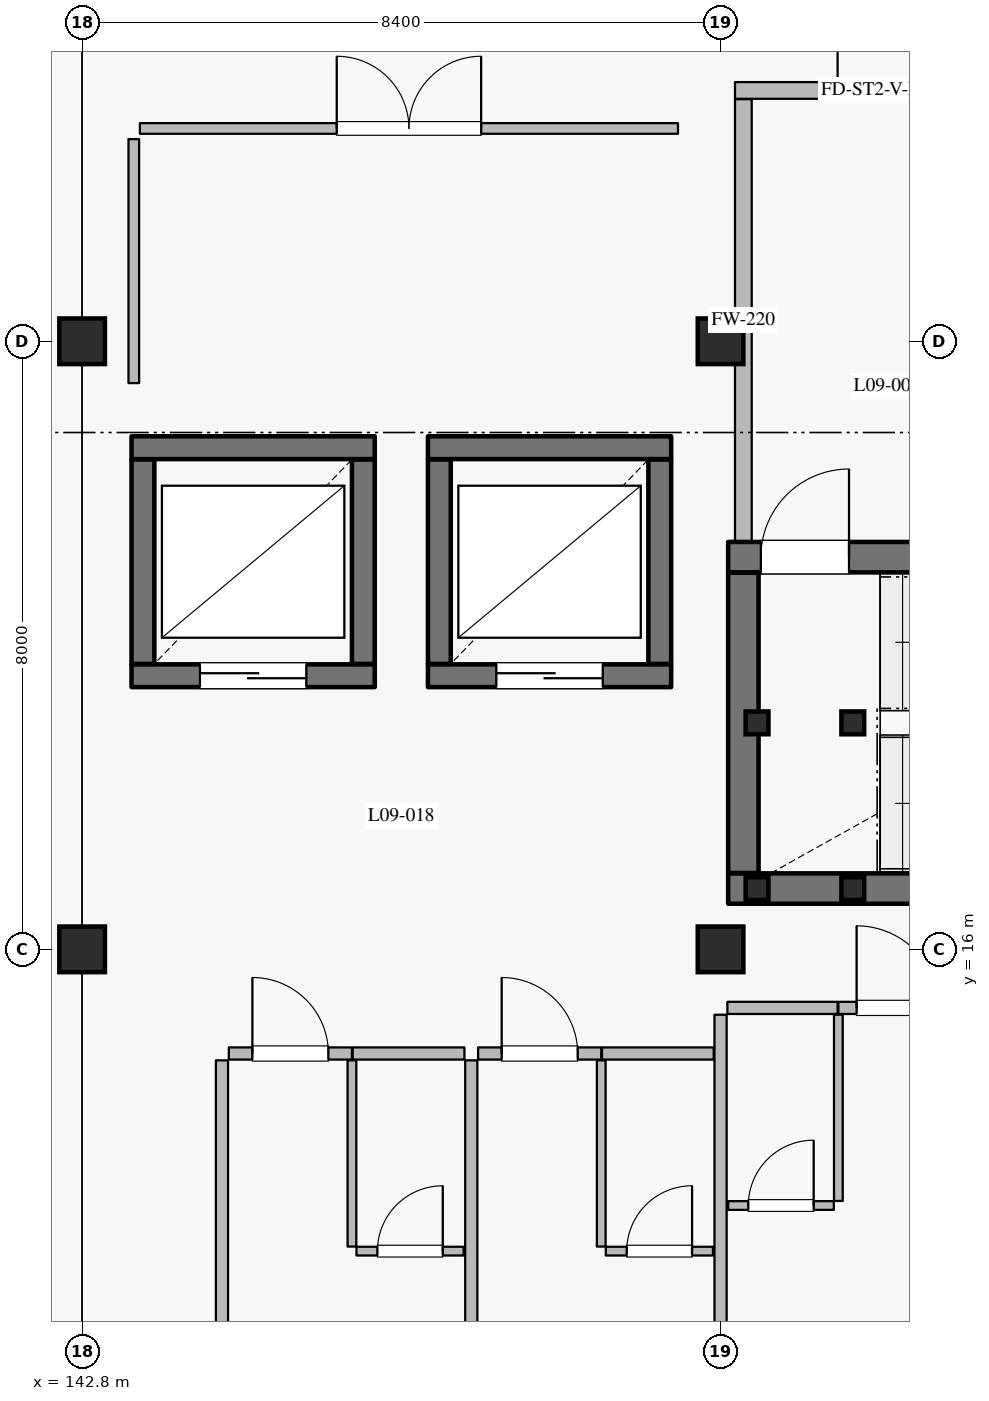
"""IFC4 building model, lengths in metres.
Left out: names, types, materials, properties, quantities, classifications, styles, units other than length and angle.
Written with IfcOpenShell. Run it as: python <this file> out.ifc"""

import sys

from ifc_helpers import new_model, si_unit, direction, frame, frame_2d, origin, origin_2d, place, context, subcontext, project, spatial, rectangle, hollow_rectangle, extrude, element, fill, save


model = new_model("IFC4")
c1 = context("Model", 3, precision=1e-05, world=origin(), true_north=direction((0.0, 1.0)))
c2 = subcontext(c1, "Body", "Model", "MODEL_VIEW")
j1 = project(units=[si_unit("LENGTHUNIT", "METRE"), si_unit("PLANEANGLEUNIT", "RADIAN")], contexts=[c1])
p1 = place(None, origin())
s1 = spatial("IfcSite", under=j1, at=p1, CompositionType="ELEMENT")
p2 = place(p1, origin())
s2 = spatial("IfcBuilding", under=s1, at=p2, CompositionType="ELEMENT")
p3 = place(p2, frame((0.0, 0.0, 39.6)))
s3 = spatial("IfcBuildingStorey", under=s2, at=p3, CompositionType="ELEMENT", Elevation=39.6)
for number, where, z_axis, x_axis in (
    (1, (142.8, 16.0, 0.0), (0.0, 0.0, 1.0), (1.0, 0.0, 0.0)),
    (2, (151.2, 24.0, 0.0), (0.0, 0.0, 1.0), (1.0, 0.0, 0.0)),
    (3, (142.8, 24.0, 0.0), (0.0, 0.0, 1.0), (1.0, 0.0, 0.0)),
    (4, (151.2, 16.0, 0.0), (0.0, 0.0, 1.0), (1.0, 0.0, 0.0)),
):
    element("IfcColumn", number, at=place(p3, frame(where, z_axis=z_axis, x_axis=x_axis)), inside=s3, PredefinedType="COLUMN", context=c2, shape_type="SweptSolid", body=[
        extrude(rectangle(XDim=0.6, YDim=0.6, at=origin_2d()), origin(), (0.0, 0.0, 1.0), 3.6),
    ])
p4 = place(p3, frame((143.45, 19.6, 0.0), z_axis=(0.0, 0.0, 1.0), x_axis=(1.0, 0.0, 0.0)))
e5 = element("IfcWall", 5, at=p4, inside=s3, PredefinedType="SHEAR", context=c2, shape_type="SweptSolid", body=[
    extrude(rectangle(XDim=3.2, YDim=0.3, at=frame_2d((1.6, 0.0))), origin(), (0.0, 0.0, 1.0), 3.335),
])
p5 = place(p4, frame((0.9, 0.0, 0.0)))
e6 = element("IfcOpeningElement", 6, at=p5, cuts=e5, PredefinedType="OPENING", context=c2, shape_type="SweptSolid", body=[
    extrude(rectangle(XDim=1.4, YDim=2.35, at=frame_2d((0.7, 1.175))), frame((0.0, 0.16, 0.0), z_axis=(0.0, -1.0, 0.0), x_axis=(1.0, 0.0, 0.0)), (0.0, 0.0, 1.0), 0.32),
])
p6 = place(p3, frame((146.5, 19.755, 0.0), z_axis=(0.0, 0.0, 1.0), x_axis=(0.0, 1.0, 0.0)))
e7 = element("IfcWall", 7, at=p6, inside=s3, PredefinedType="SHEAR", context=c2, shape_type="SweptSolid", body=[
    extrude(rectangle(XDim=2.69, YDim=0.3, at=frame_2d((1.345, 0.0))), origin(), (0.0, 0.0, 1.0), 3.335),
])
p7 = place(p3, frame((146.65, 22.6, 0.0), z_axis=(0.0, 0.0, 1.0), x_axis=(-1.0, 0.0, 0.0)))
e8 = element("IfcWall", 8, at=p7, inside=s3, PredefinedType="SHEAR", context=c2, shape_type="SweptSolid", body=[
    extrude(rectangle(XDim=3.2, YDim=0.3, at=frame_2d((1.6, 0.0))), origin(), (0.0, 0.0, 1.0), 3.335),
])
p8 = place(p3, frame((143.6, 22.445, 0.0), z_axis=(0.0, 0.0, 1.0), x_axis=(0.0, -1.0, 0.0)))
e9 = element("IfcWall", 9, at=p8, inside=s3, PredefinedType="SHEAR", context=c2, shape_type="SweptSolid", body=[
    extrude(rectangle(XDim=2.69, YDim=0.3, at=frame_2d((1.345, 0.0))), origin(), (0.0, 0.0, 1.0), 3.335),
])
p9 = place(p3, frame((147.35, 19.6, 0.0), z_axis=(0.0, 0.0, 1.0), x_axis=(1.0, 0.0, 0.0)))
e10 = element("IfcWall", 10, at=p9, inside=s3, PredefinedType="SHEAR", context=c2, shape_type="SweptSolid", body=[
    extrude(rectangle(XDim=3.2, YDim=0.3, at=frame_2d((1.6, 0.0))), origin(), (0.0, 0.0, 1.0), 3.335),
])
p10 = place(p9, frame((0.9, 0.0, 0.0)))
e11 = element("IfcOpeningElement", 11, at=p10, cuts=e10, PredefinedType="OPENING", context=c2, shape_type="SweptSolid", body=[
    extrude(rectangle(XDim=1.4, YDim=2.35, at=frame_2d((0.7, 1.175))), frame((0.0, 0.16, 0.0), z_axis=(0.0, -1.0, 0.0), x_axis=(1.0, 0.0, 0.0)), (0.0, 0.0, 1.0), 0.32),
])
p11 = place(p3, frame((150.4, 19.755, 0.0), z_axis=(0.0, 0.0, 1.0), x_axis=(0.0, 1.0, 0.0)))
e12 = element("IfcWall", 12, at=p11, inside=s3, PredefinedType="SHEAR", context=c2, shape_type="SweptSolid", body=[
    extrude(rectangle(XDim=2.69, YDim=0.3, at=frame_2d((1.345, 0.0))), origin(), (0.0, 0.0, 1.0), 3.335),
])
p12 = place(p3, frame((150.55, 22.6, 0.0), z_axis=(0.0, 0.0, 1.0), x_axis=(-1.0, 0.0, 0.0)))
e13 = element("IfcWall", 13, at=p12, inside=s3, PredefinedType="SHEAR", context=c2, shape_type="SweptSolid", body=[
    extrude(rectangle(XDim=3.2, YDim=0.3, at=frame_2d((1.6, 0.0))), origin(), (0.0, 0.0, 1.0), 3.335),
])
p13 = place(p3, frame((147.5, 22.445, 0.0), z_axis=(0.0, 0.0, 1.0), x_axis=(0.0, -1.0, 0.0)))
e14 = element("IfcWall", 14, at=p13, inside=s3, PredefinedType="SHEAR", context=c2, shape_type="SweptSolid", body=[
    extrude(rectangle(XDim=2.69, YDim=0.3, at=frame_2d((1.345, 0.0))), origin(), (0.0, 0.0, 1.0), 3.335),
])
p14 = place(p3, frame((151.3, 16.8, 0.0), z_axis=(0.0, 0.0, 1.0), x_axis=(1.0, 0.0, 0.0)))
e15 = element("IfcWall", 15, at=p14, inside=s3, PredefinedType="SHEAR", context=c2, shape_type="SweptSolid", body=[
    extrude(rectangle(XDim=8.2, YDim=0.4, at=frame_2d((4.1, 0.0))), origin(), (0.0, 0.0, 1.0), 3.335),
])
p15 = place(p3, frame((151.3, 21.16, 0.0), z_axis=(0.0, 0.0, 1.0), x_axis=(1.0, 0.0, 0.0)))
e16 = element("IfcWall", 16, at=p15, inside=s3, PredefinedType="SHEAR", context=c2, shape_type="SweptSolid", body=[
    extrude(rectangle(XDim=8.2, YDim=0.4, at=frame_2d((4.1, 0.0))), origin(), (0.0, 0.0, 1.0), 3.335),
])
p16 = place(p15, frame((0.43, 0.0, 0.0)))
e17 = element("IfcOpeningElement", 17, at=p16, cuts=e16, PredefinedType="OPENING", context=c2, shape_type="SweptSolid", body=[
    extrude(rectangle(XDim=1.16, YDim=2.2, at=frame_2d((0.58, 1.1))), frame((0.0, 0.21, 0.0), z_axis=(0.0, -1.0, 0.0), x_axis=(1.0, 0.0, 0.0)), (0.0, 0.0, 1.0), 0.42),
])
p17 = place(p3, frame((151.5, 17.005, 0.0), z_axis=(0.0, 0.0, 1.0), x_axis=(0.0, 1.0, 0.0)))
e18 = element("IfcWall", 18, at=p17, inside=s3, PredefinedType="SHEAR", context=c2, shape_type="SweptSolid", body=[
    extrude(rectangle(XDim=3.95, YDim=0.4, at=frame_2d((1.975, 0.0))), origin(), (0.0, 0.0, 1.0), 3.335),
])
p18 = place(p3, frame((151.5, 21.365, 0.0), z_axis=(0.0, 0.0, 1.0), x_axis=(0.0, 1.0, 0.0)))
e19 = element("IfcWall", 19, at=p18, inside=s3, PredefinedType="PARTITIONING", context=c2, shape_type="SweptSolid", body=[
    extrude(rectangle(XDim=5.82, YDim=0.22, at=frame_2d((2.91, 0.0))), origin(), (0.0, 0.0, 1.0), 3.335),
])
p19 = place(p3, frame((151.39, 27.3, 0.0), z_axis=(0.0, 0.0, 1.0), x_axis=(1.0, 0.0, 0.0)))
e20 = element("IfcWall", 20, at=p19, inside=s3, PredefinedType="PARTITIONING", context=c2, shape_type="SweptSolid", body=[
    extrude(rectangle(XDim=3.82, YDim=0.22, at=frame_2d((1.91, 0.0))), origin(), (0.0, 0.0, 1.0), 3.335),
])
p20 = place(p19, frame((1.35, 0.0, 0.0)))
e21 = element("IfcOpeningElement", 21, at=p20, cuts=e20, PredefinedType="OPENING", context=c2, shape_type="SweptSolid", body=[
    extrude(rectangle(XDim=1.12, YDim=2.2, at=frame_2d((0.56, 1.1))), frame((0.0, 0.12, 0.0), z_axis=(0.0, -1.0, 0.0), x_axis=(1.0, 0.0, 0.0)), (0.0, 0.0, 1.0), 0.24),
])
for number, where, z_axis, x_axis in (
    (22, (151.68, 16.8, 0.0), (0.0, 0.0, 1.0), (1.0, 0.0, 0.0)),
    (23, (151.68, 18.98, 0.0), (0.0, 0.0, 1.0), (1.0, 0.0, 0.0)),
    (24, (152.94, 16.8, 0.0), (0.0, 0.0, 1.0), (1.0, 0.0, 0.0)),
    (25, (152.94, 18.98, 0.0), (0.0, 0.0, 1.0), (1.0, 0.0, 0.0)),
):
    element("IfcColumn", number, at=place(p3, frame(where, z_axis=z_axis, x_axis=x_axis)), inside=s3, PredefinedType="COLUMN", context=c2, shape_type="SweptSolid", body=[
        extrude(hollow_rectangle(XDim=0.3, YDim=0.3, WallThickness=0.012, at=origin_2d()), origin(), (0.0, 0.0, 1.0), 3.42),
    ])
p21 = place(p3, frame((144.73, 14.63, 0.0), z_axis=(0.0, 0.0, 1.0), x_axis=(1.0, 0.0, 0.0)))
e26 = element("IfcWall", 26, at=p21, inside=s3, PredefinedType="PARTITIONING", context=c2, shape_type="SweptSolid", body=[
    extrude(rectangle(XDim=1.62, YDim=0.16, at=frame_2d((0.81, 0.0))), origin(), (0.0, 0.0, 1.0), 3.335),
])
p22 = place(p21, frame((0.31, 0.0, 0.0)))
e27 = element("IfcOpeningElement", 27, at=p22, cuts=e26, PredefinedType="OPENING", context=c2, shape_type="SweptSolid", body=[
    extrude(rectangle(XDim=1.0, YDim=2.25, at=frame_2d((0.5, 1.125))), frame((0.0, 0.09, 0.0), z_axis=(0.0, -1.0, 0.0), x_axis=(1.0, 0.0, 0.0)), (0.0, 0.0, 1.0), 0.18),
])
p23 = place(p3, frame((146.36, 14.63, 0.0), z_axis=(0.0, 0.0, 1.0), x_axis=(1.0, 0.0, 0.0)))
e28 = element("IfcWall", 28, at=p23, inside=s3, PredefinedType="PARTITIONING", context=c2, shape_type="SweptSolid", body=[
    extrude(rectangle(XDim=1.47, YDim=0.16, at=frame_2d((0.735, 0.0))), origin(), (0.0, 0.0, 1.0), 3.335),
])
p24 = place(p3, frame((146.35, 12.09, 0.0), z_axis=(0.0, 0.0, 1.0), x_axis=(0.0, 1.0, 0.0)))
e29 = element("IfcWall", 29, at=p24, inside=s3, PredefinedType="PARTITIONING", context=c2, shape_type="SweptSolid", body=[
    extrude(rectangle(XDim=2.45, YDim=0.115, at=frame_2d((1.225, 0.0))), origin(), (0.0, 0.0, 1.0), 3.335),
])
p25 = place(p3, frame((146.41, 12.03, 0.0), z_axis=(0.0, 0.0, 1.0), x_axis=(1.0, 0.0, 0.0)))
e30 = element("IfcWall", 30, at=p25, inside=s3, PredefinedType="PARTITIONING", context=c2, shape_type="SweptSolid", body=[
    extrude(rectangle(XDim=1.41, YDim=0.115, at=frame_2d((0.705, 0.0))), origin(), (0.0, 0.0, 1.0), 3.335),
])
p26 = place(p25, frame((0.275, 0.0, 0.0)))
e31 = element("IfcOpeningElement", 31, at=p26, cuts=e30, PredefinedType="OPENING", context=c2, shape_type="SweptSolid", body=[
    extrude(rectangle(XDim=0.86, YDim=2.12, at=frame_2d((0.43, 1.06))), frame((0.0, 0.067, 0.0), z_axis=(0.0, -1.0, 0.0), x_axis=(1.0, 0.0, 0.0)), (0.0, 0.0, 1.0), 0.135),
])
p27 = place(p3, frame((144.64, 5.22, 0.0), z_axis=(0.0, 0.0, 1.0), x_axis=(0.0, 1.0, 0.0)))
e32 = element("IfcWall", 32, at=p27, inside=s3, PredefinedType="PARTITIONING", context=c2, shape_type="SweptSolid", body=[
    extrude(rectangle(XDim=9.32, YDim=0.16, at=frame_2d((4.66, 0.0))), origin(), (0.0, 0.0, 1.0), 3.335),
])
p28 = place(p3, frame((148.01, 14.63, 0.0), z_axis=(0.0, 0.0, 1.0), x_axis=(1.0, 0.0, 0.0)))
e33 = element("IfcWall", 33, at=p28, inside=s3, PredefinedType="PARTITIONING", context=c2, shape_type="SweptSolid", body=[
    extrude(rectangle(XDim=1.62, YDim=0.16, at=frame_2d((0.81, 0.0))), origin(), (0.0, 0.0, 1.0), 3.335),
])
p29 = place(p28, frame((0.31, 0.0, 0.0)))
e34 = element("IfcOpeningElement", 34, at=p29, cuts=e33, PredefinedType="OPENING", context=c2, shape_type="SweptSolid", body=[
    extrude(rectangle(XDim=1.0, YDim=2.25, at=frame_2d((0.5, 1.125))), frame((0.0, 0.09, 0.0), z_axis=(0.0, -1.0, 0.0), x_axis=(1.0, 0.0, 0.0)), (0.0, 0.0, 1.0), 0.18),
])
p30 = place(p3, frame((149.64, 14.63, 0.0), z_axis=(0.0, 0.0, 1.0), x_axis=(1.0, 0.0, 0.0)))
e35 = element("IfcWall", 35, at=p30, inside=s3, PredefinedType="PARTITIONING", context=c2, shape_type="SweptSolid", body=[
    extrude(rectangle(XDim=1.47, YDim=0.16, at=frame_2d((0.735, 0.0))), origin(), (0.0, 0.0, 1.0), 3.335),
])
p31 = place(p3, frame((149.63, 12.09, 0.0), z_axis=(0.0, 0.0, 1.0), x_axis=(0.0, 1.0, 0.0)))
e36 = element("IfcWall", 36, at=p31, inside=s3, PredefinedType="PARTITIONING", context=c2, shape_type="SweptSolid", body=[
    extrude(rectangle(XDim=2.45, YDim=0.115, at=frame_2d((1.225, 0.0))), origin(), (0.0, 0.0, 1.0), 3.335),
])
p32 = place(p3, frame((149.69, 12.03, 0.0), z_axis=(0.0, 0.0, 1.0), x_axis=(1.0, 0.0, 0.0)))
e37 = element("IfcWall", 37, at=p32, inside=s3, PredefinedType="PARTITIONING", context=c2, shape_type="SweptSolid", body=[
    extrude(rectangle(XDim=1.41, YDim=0.115, at=frame_2d((0.705, 0.0))), origin(), (0.0, 0.0, 1.0), 3.335),
])
p33 = place(p32, frame((0.275, 0.0, 0.0)))
e38 = element("IfcOpeningElement", 38, at=p33, cuts=e37, PredefinedType="OPENING", context=c2, shape_type="SweptSolid", body=[
    extrude(rectangle(XDim=0.86, YDim=2.12, at=frame_2d((0.43, 1.06))), frame((0.0, 0.067, 0.0), z_axis=(0.0, -1.0, 0.0), x_axis=(1.0, 0.0, 0.0)), (0.0, 0.0, 1.0), 0.135),
])
p34 = place(p3, frame((147.92, 8.34, 0.0), z_axis=(0.0, 0.0, 1.0), x_axis=(0.0, 1.0, 0.0)))
e39 = element("IfcWall", 39, at=p34, inside=s3, PredefinedType="PARTITIONING", context=c2, shape_type="SweptSolid", body=[
    extrude(rectangle(XDim=6.2, YDim=0.16, at=frame_2d((3.1, 0.0))), origin(), (0.0, 0.0, 1.0), 3.335),
])
p35 = place(p3, frame((151.29, 15.23, 0.0), z_axis=(0.0, 0.0, 1.0), x_axis=(1.0, 0.0, 0.0)))
e40 = element("IfcWall", 40, at=p35, inside=s3, PredefinedType="PARTITIONING", context=c2, shape_type="SweptSolid", body=[
    extrude(rectangle(XDim=1.45, YDim=0.16, at=frame_2d((0.725, 0.0))), origin(), (0.0, 0.0, 1.0), 3.335),
])
p36 = place(p3, frame((152.75, 15.23, 0.0), z_axis=(0.0, 0.0, 1.0), x_axis=(1.0, 0.0, 0.0)))
e41 = element("IfcWall", 41, at=p36, inside=s3, PredefinedType="PARTITIONING", context=c2, shape_type="SweptSolid", body=[
    extrude(rectangle(XDim=1.56, YDim=0.16, at=frame_2d((0.78, 0.0))), origin(), (0.0, 0.0, 1.0), 3.335),
])
p37 = place(p36, frame((0.24, 0.0, 0.0)))
e42 = element("IfcOpeningElement", 42, at=p37, cuts=e41, PredefinedType="OPENING", context=c2, shape_type="SweptSolid", body=[
    extrude(rectangle(XDim=1.08, YDim=2.3, at=frame_2d((0.54, 1.15))), frame((0.0, 0.09, 0.0), z_axis=(0.0, -1.0, 0.0), x_axis=(1.0, 0.0, 0.0)), (0.0, 0.0, 1.0), 0.18),
])
p38 = place(p3, frame((152.75, 12.69, 0.0), z_axis=(0.0, 0.0, 1.0), x_axis=(0.0, 1.0, 0.0)))
e43 = element("IfcWall", 43, at=p38, inside=s3, PredefinedType="PARTITIONING", context=c2, shape_type="SweptSolid", body=[
    extrude(rectangle(XDim=2.45, YDim=0.115, at=frame_2d((1.225, 0.0))), origin(), (0.0, 0.0, 1.0), 3.335),
])
p39 = place(p3, frame((151.3, 12.63, 0.0), z_axis=(0.0, 0.0, 1.0), x_axis=(1.0, 0.0, 0.0)))
e44 = element("IfcWall", 44, at=p39, inside=s3, PredefinedType="PARTITIONING", context=c2, shape_type="SweptSolid", body=[
    extrude(rectangle(XDim=1.39, YDim=0.115, at=frame_2d((0.695, 0.0))), origin(), (0.0, 0.0, 1.0), 3.335),
])
p40 = place(p39, frame((0.265, 0.0, 0.0)))
e45 = element("IfcOpeningElement", 45, at=p40, cuts=e44, PredefinedType="OPENING", context=c2, shape_type="SweptSolid", body=[
    extrude(rectangle(XDim=0.86, YDim=2.12, at=frame_2d((0.43, 1.06))), frame((0.0, 0.067, 0.0), z_axis=(0.0, -1.0, 0.0), x_axis=(1.0, 0.0, 0.0)), (0.0, 0.0, 1.0), 0.135),
])
p41 = place(p3, frame((151.2, 8.34, 0.0), z_axis=(0.0, 0.0, 1.0), x_axis=(0.0, 1.0, 0.0)))
e46 = element("IfcWall", 46, at=p41, inside=s3, PredefinedType="PARTITIONING", context=c2, shape_type="SweptSolid", body=[
    extrude(rectangle(XDim=6.8, YDim=0.16, at=frame_2d((3.4, 0.0))), origin(), (0.0, 0.0, 1.0), 2.74),
])
p42 = place(p3, frame((143.56, 26.8, 0.0), z_axis=(0.0, 0.0, 1.0), x_axis=(1.0, 0.0, 0.0)))
e47 = element("IfcWall", 47, at=p42, inside=s3, PredefinedType="PARTITIONING", context=c2, shape_type="SweptSolid", body=[
    extrude(rectangle(XDim=7.08, YDim=0.14, at=frame_2d((3.54, 0.0))), origin(), (0.0, 0.0, 1.0), 3.335),
])
p43 = place(p42, frame((2.59, 0.0, 0.0)))
e48 = element("IfcOpeningElement", 48, at=p43, cuts=e47, PredefinedType="OPENING", context=c2, shape_type="SweptSolid", body=[
    extrude(rectangle(XDim=1.9, YDim=2.4, at=frame_2d((0.95, 1.2))), frame((0.0, 0.08, 0.0), z_axis=(0.0, -1.0, 0.0), x_axis=(1.0, 0.0, 0.0)), (0.0, 0.0, 1.0), 0.16),
])
p44 = place(p3, frame((143.48, 23.45, 0.0), z_axis=(0.0, 0.0, 1.0), x_axis=(0.0, 1.0, 0.0)))
e49 = element("IfcWall", 49, at=p44, inside=s3, PredefinedType="PARTITIONING", context=c2, shape_type="SweptSolid", body=[
    extrude(rectangle(XDim=3.21, YDim=0.14, at=frame_2d((1.605, 0.0))), origin(), (0.0, 0.0, 1.0), 3.335),
])
p45 = place(p5, origin())
e50 = element("IfcDoor", 50, at=p45, inside=s3, OperationType="DOUBLE_DOOR_SLIDING", PredefinedType="DOOR", context=c2, shape_type="SweptSolid", body=[
    extrude(rectangle(XDim=1.4, YDim=2.35, at=frame_2d((0.7, 1.175))), frame((0.0, 0.025, 0.0), z_axis=(0.0, -1.0, 0.0), x_axis=(1.0, 0.0, 0.0)), (0.0, 0.0, 1.0), 0.05),
])
fill(e6, e50)
p46 = place(p10, origin())
e51 = element("IfcDoor", 51, at=p46, inside=s3, OperationType="DOUBLE_DOOR_SLIDING", PredefinedType="DOOR", context=c2, shape_type="SweptSolid", body=[
    extrude(rectangle(XDim=1.4, YDim=2.35, at=frame_2d((0.7, 1.175))), frame((0.0, 0.025, 0.0), z_axis=(0.0, -1.0, 0.0), x_axis=(1.0, 0.0, 0.0)), (0.0, 0.0, 1.0), 0.05),
])
fill(e11, e51)
p47 = place(p16, origin())
e52 = element("IfcDoor", 52, at=p47, inside=s3, OperationType="SINGLE_SWING_RIGHT", PredefinedType="DOOR", context=c2, shape_type="SweptSolid", body=[
    extrude(rectangle(XDim=1.16, YDim=2.2, at=frame_2d((0.58, 1.1))), frame((0.0, 0.025, 0.0), z_axis=(0.0, -1.0, 0.0), x_axis=(1.0, 0.0, 0.0)), (0.0, 0.0, 1.0), 0.05),
])
fill(e17, e52)
p48 = place(p20, origin())
e53 = element("IfcDoor", 53, at=p48, inside=s3, OperationType="SINGLE_SWING_LEFT", PredefinedType="DOOR", context=c2, shape_type="SweptSolid", body=[
    extrude(rectangle(XDim=1.12, YDim=2.2, at=frame_2d((0.56, 1.1))), frame((0.0, 0.025, 0.0), z_axis=(0.0, -1.0, 0.0), x_axis=(1.0, 0.0, 0.0)), (0.0, 0.0, 1.0), 0.05),
])
fill(e21, e53)
p49 = place(p22, origin())
e54 = element("IfcDoor", 54, at=p49, inside=s3, OperationType="SINGLE_SWING_LEFT", PredefinedType="DOOR", context=c2, shape_type="SweptSolid", body=[
    extrude(rectangle(XDim=1.0, YDim=2.25, at=frame_2d((0.5, 1.125))), frame((0.0, 0.025, 0.0), z_axis=(0.0, -1.0, 0.0), x_axis=(1.0, 0.0, 0.0)), (0.0, 0.0, 1.0), 0.05),
])
fill(e27, e54)
p50 = place(p26, origin())
e55 = element("IfcDoor", 55, at=p50, inside=s3, OperationType="SINGLE_SWING_RIGHT", PredefinedType="DOOR", context=c2, shape_type="SweptSolid", body=[
    extrude(rectangle(XDim=0.86, YDim=2.12, at=frame_2d((0.43, 1.06))), frame((0.0, 0.025, 0.0), z_axis=(0.0, -1.0, 0.0), x_axis=(1.0, 0.0, 0.0)), (0.0, 0.0, 1.0), 0.05),
])
fill(e31, e55)
p51 = place(p29, origin())
e56 = element("IfcDoor", 56, at=p51, inside=s3, OperationType="SINGLE_SWING_LEFT", PredefinedType="DOOR", context=c2, shape_type="SweptSolid", body=[
    extrude(rectangle(XDim=1.0, YDim=2.25, at=frame_2d((0.5, 1.125))), frame((0.0, 0.025, 0.0), z_axis=(0.0, -1.0, 0.0), x_axis=(1.0, 0.0, 0.0)), (0.0, 0.0, 1.0), 0.05),
])
fill(e34, e56)
p52 = place(p33, origin())
e57 = element("IfcDoor", 57, at=p52, inside=s3, OperationType="SINGLE_SWING_RIGHT", PredefinedType="DOOR", context=c2, shape_type="SweptSolid", body=[
    extrude(rectangle(XDim=0.86, YDim=2.12, at=frame_2d((0.43, 1.06))), frame((0.0, 0.025, 0.0), z_axis=(0.0, -1.0, 0.0), x_axis=(1.0, 0.0, 0.0)), (0.0, 0.0, 1.0), 0.05),
])
fill(e38, e57)
p53 = place(p37, origin())
e58 = element("IfcDoor", 58, at=p53, inside=s3, OperationType="SINGLE_SWING_LEFT", PredefinedType="DOOR", context=c2, shape_type="SweptSolid", body=[
    extrude(rectangle(XDim=1.08, YDim=2.3, at=frame_2d((0.54, 1.15))), frame((0.0, 0.025, 0.0), z_axis=(0.0, -1.0, 0.0), x_axis=(1.0, 0.0, 0.0)), (0.0, 0.0, 1.0), 0.05),
])
fill(e42, e58)
p54 = place(p40, origin())
e59 = element("IfcDoor", 59, at=p54, inside=s3, OperationType="SINGLE_SWING_RIGHT", PredefinedType="DOOR", context=c2, shape_type="SweptSolid", body=[
    extrude(rectangle(XDim=0.86, YDim=2.12, at=frame_2d((0.43, 1.06))), frame((0.0, 0.025, 0.0), z_axis=(0.0, -1.0, 0.0), x_axis=(1.0, 0.0, 0.0)), (0.0, 0.0, 1.0), 0.05),
])
fill(e45, e59)
p55 = place(p43, origin())
e60 = element("IfcDoor", 60, at=p55, inside=s3, OperationType="DOUBLE_DOOR_SINGLE_SWING", PredefinedType="DOOR", context=c2, shape_type="SweptSolid", body=[
    extrude(rectangle(XDim=1.9, YDim=2.4, at=frame_2d((0.95, 1.2))), frame((0.0, 0.025, 0.0), z_axis=(0.0, -1.0, 0.0), x_axis=(1.0, 0.0, 0.0)), (0.0, 0.0, 1.0), 0.05),
])
fill(e48, e60)
save(model, sys.argv[1])
